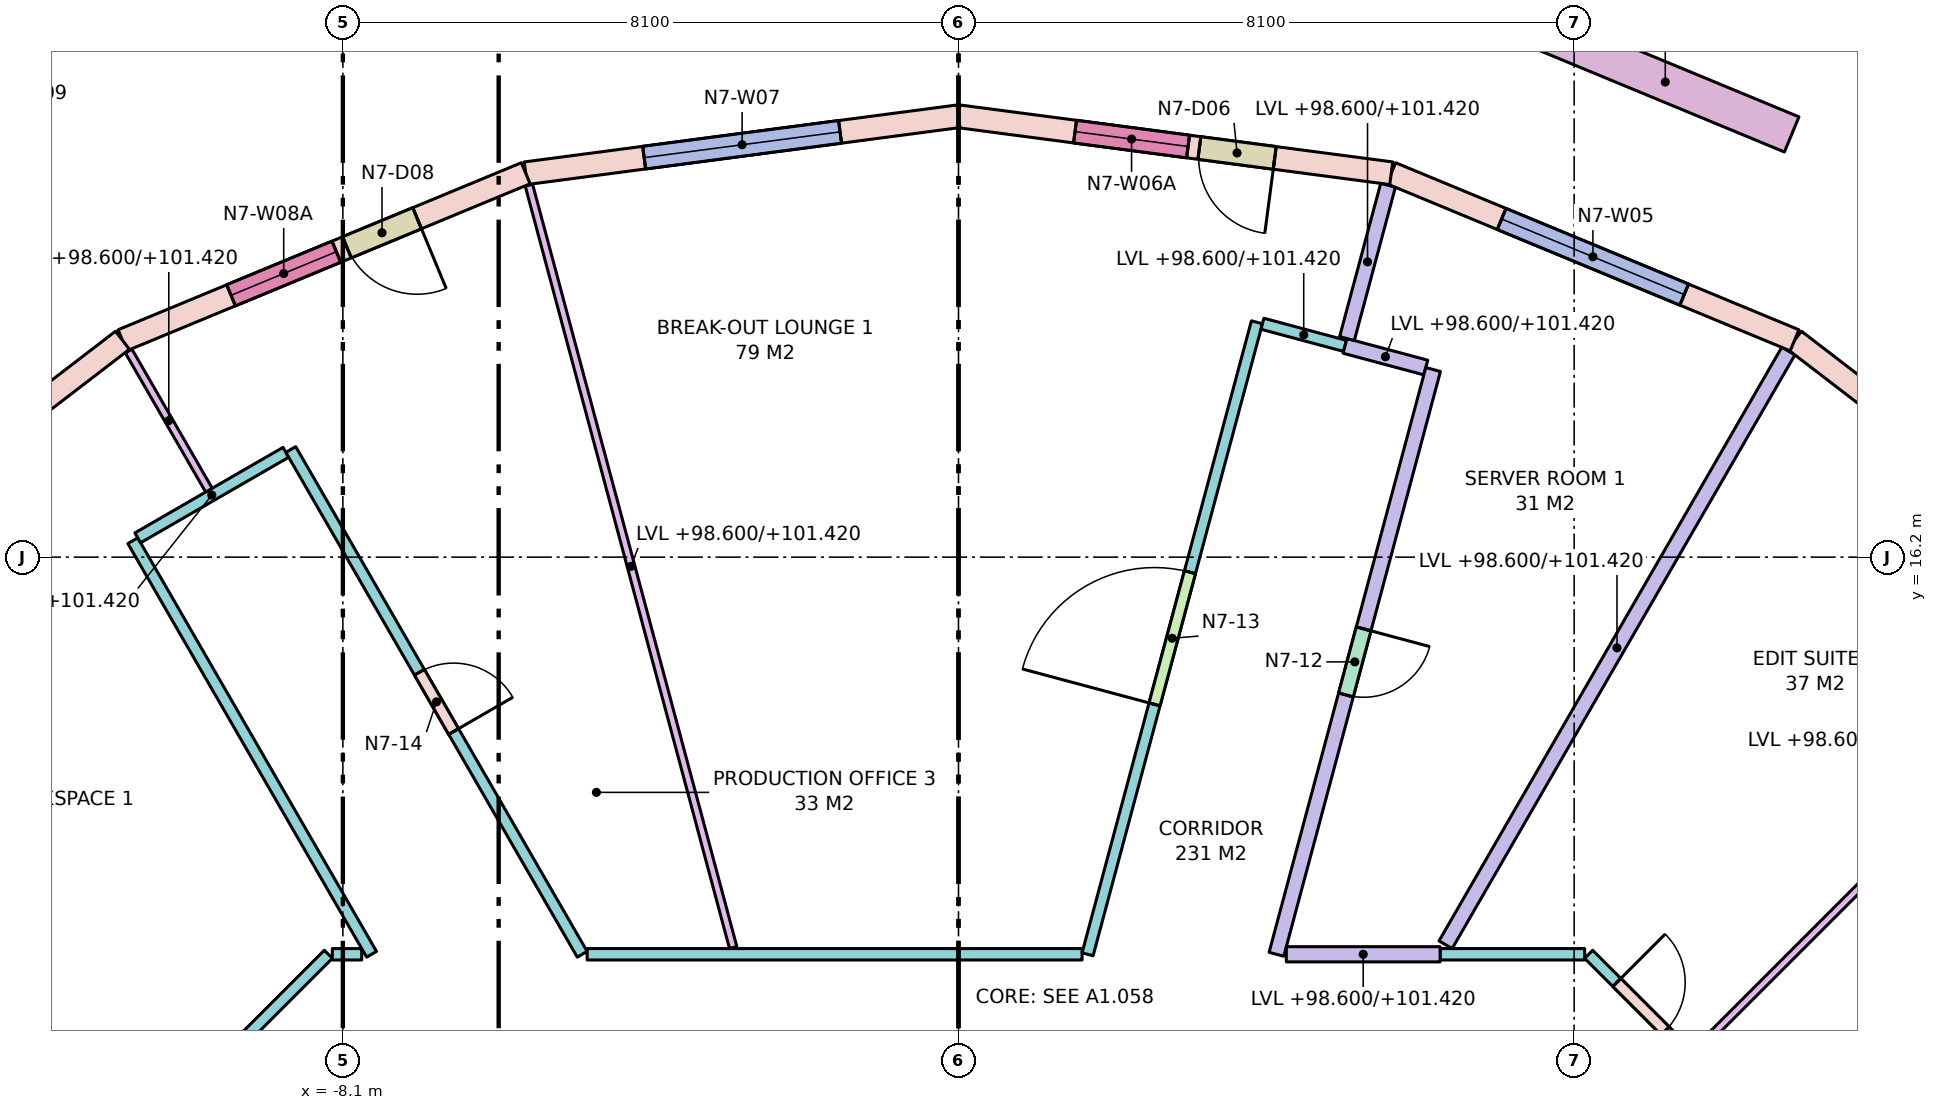
"""IFC4 building model, lengths in metres.
Left out: names, types, materials, properties, quantities, classifications, styles, units other than length and angle.
Written with IfcOpenShell. Run it as: python <this file> out.ifc"""

import sys

from ifc_helpers import new_model, si_unit, direction, frame, frame_2d, origin, place, context, subcontext, project, spatial, rectangle, extrude, element, fill, save


model = new_model("IFC4")
c1 = context("Model", 3, precision=1e-05, world=origin(), true_north=direction((0.0, 1.0)))
c2 = subcontext(c1, "Body", "Model", "MODEL_VIEW")
j1 = project(units=[si_unit("LENGTHUNIT", "METRE"), si_unit("PLANEANGLEUNIT", "RADIAN")], contexts=[c1])
p1 = place(None, origin())
s1 = spatial("IfcSite", under=j1, at=p1, CompositionType="ELEMENT")
p2 = place(p1, origin())
s2 = spatial("IfcBuilding", under=s1, at=p2, CompositionType="ELEMENT")
p3 = place(p2, frame((0.0, 0.0, 98.6)))
s3 = spatial("IfcBuildingStorey", under=s2, at=p3, CompositionType="ELEMENT", Elevation=98.6)
p4 = place(p3, frame((15.556, 15.556, 0.0), z_axis=(0.0, 0.0, 1.0), x_axis=(-0.793366142647, 0.608744744291, 0.0)))
e1 = element("IfcWall", 1, at=p4, inside=s3, PredefinedType="STANDARD", context=c2, shape_type="SweptSolid", body=[
    extrude(rectangle(XDim=5.743, YDim=0.3, at=frame_2d((2.872, 0.0))), origin(), (0.0, 0.0, 1.0), 3.72),
])
p5 = place(p4, frame((1.547, 0.0, 0.0)))
e2 = element("IfcOpeningElement", 2, at=p5, cuts=e1, PredefinedType="OPENING", context=c2, shape_type="SweptSolid", body=[
    extrude(rectangle(XDim=1.0, YDim=2.4, at=frame_2d((0.5, 1.2))), frame((0.0, 0.16, 0.0), z_axis=(0.0, -1.0, 0.0), x_axis=(1.0, 0.0, 0.0)), (0.0, 0.0, 1.0), 0.32),
])
p6 = place(p4, frame((2.697, 0.0, 0.8)))
e3 = element("IfcOpeningElement", 3, at=p6, cuts=e1, PredefinedType="OPENING", context=c2, shape_type="SweptSolid", body=[
    extrude(rectangle(XDim=1.5, YDim=2.7, at=frame_2d((0.75, 1.35))), frame((0.0, 0.16, 0.0), z_axis=(0.0, -1.0, 0.0), x_axis=(1.0, 0.0, 0.0)), (0.0, 0.0, 1.0), 0.32),
])
p7 = place(p3, frame((11.0, 19.052, 0.0), z_axis=(0.0, 0.0, 1.0), x_axis=(-0.923866055759, 0.382715966503, 0.0)))
e4 = element("IfcWall", 4, at=p7, inside=s3, PredefinedType="STANDARD", context=c2, shape_type="SweptSolid", body=[
    extrude(rectangle(XDim=5.743, YDim=0.3, at=frame_2d((2.872, 0.0))), origin(), (0.0, 0.0, 1.0), 3.72),
])
p8 = place(p7, frame((1.572, 0.0, 0.8)))
e5 = element("IfcOpeningElement", 5, at=p8, cuts=e4, PredefinedType="OPENING", context=c2, shape_type="SweptSolid", body=[
    extrude(rectangle(XDim=2.6, YDim=2.7, at=frame_2d((1.3, 1.35))), frame((0.0, 0.16, 0.0), z_axis=(0.0, -1.0, 0.0), x_axis=(1.0, 0.0, 0.0)), (0.0, 0.0, 1.0), 0.32),
])
p9 = place(p3, frame((5.694, 21.25, 0.0), z_axis=(0.0, 0.0, 1.0), x_axis=(-0.991447783331, 0.130503995834, 0.0)))
e6 = element("IfcWall", 6, at=p9, inside=s3, PredefinedType="STANDARD", context=c2, shape_type="SweptSolid", body=[
    extrude(rectangle(XDim=5.743, YDim=0.3, at=frame_2d((2.872, 0.0))), origin(), (0.0, 0.0, 1.0), 3.72),
])
p10 = place(p9, frame((1.547, 0.0, 0.0)))
e7 = element("IfcOpeningElement", 7, at=p10, cuts=e6, PredefinedType="OPENING", context=c2, shape_type="SweptSolid", body=[
    extrude(rectangle(XDim=1.0, YDim=2.4, at=frame_2d((0.5, 1.2))), frame((0.0, 0.16, 0.0), z_axis=(0.0, -1.0, 0.0), x_axis=(1.0, 0.0, 0.0)), (0.0, 0.0, 1.0), 0.32),
])
p11 = place(p9, frame((2.697, 0.0, 0.8)))
e8 = element("IfcOpeningElement", 8, at=p11, cuts=e6, PredefinedType="OPENING", context=c2, shape_type="SweptSolid", body=[
    extrude(rectangle(XDim=1.5, YDim=2.7, at=frame_2d((0.75, 1.35))), frame((0.0, 0.16, 0.0), z_axis=(0.0, -1.0, 0.0), x_axis=(1.0, 0.0, 0.0)), (0.0, 0.0, 1.0), 0.32),
])
p12 = place(p3, frame((0.0, 22.0, 0.0), z_axis=(0.0, 0.0, 1.0), x_axis=(-0.991447783331, -0.130503995834, 0.0)))
e9 = element("IfcWall", 9, at=p12, inside=s3, PredefinedType="STANDARD", context=c2, shape_type="SweptSolid", body=[
    extrude(rectangle(XDim=5.743, YDim=0.3, at=frame_2d((2.872, 0.0))), origin(), (0.0, 0.0, 1.0), 3.72),
])
p13 = place(p12, frame((1.572, 0.0, 0.8)))
e10 = element("IfcOpeningElement", 10, at=p13, cuts=e9, PredefinedType="OPENING", context=c2, shape_type="SweptSolid", body=[
    extrude(rectangle(XDim=2.6, YDim=2.7, at=frame_2d((1.3, 1.35))), frame((0.0, 0.16, 0.0), z_axis=(0.0, -1.0, 0.0), x_axis=(1.0, 0.0, 0.0)), (0.0, 0.0, 1.0), 0.32),
])
p14 = place(p3, frame((-5.694, 21.25, 0.0), z_axis=(0.0, 0.0, 1.0), x_axis=(-0.923866055759, -0.382715966503, 0.0)))
e11 = element("IfcWall", 11, at=p14, inside=s3, PredefinedType="STANDARD", context=c2, shape_type="SweptSolid", body=[
    extrude(rectangle(XDim=5.743, YDim=0.3, at=frame_2d((2.872, 0.0))), origin(), (0.0, 0.0, 1.0), 3.72),
])
p15 = place(p14, frame((1.547, 0.0, 0.0)))
e12 = element("IfcOpeningElement", 12, at=p15, cuts=e11, PredefinedType="OPENING", context=c2, shape_type="SweptSolid", body=[
    extrude(rectangle(XDim=1.0, YDim=2.4, at=frame_2d((0.5, 1.2))), frame((0.0, 0.16, 0.0), z_axis=(0.0, -1.0, 0.0), x_axis=(1.0, 0.0, 0.0)), (0.0, 0.0, 1.0), 0.32),
])
p16 = place(p14, frame((2.697, 0.0, 0.8)))
e13 = element("IfcOpeningElement", 13, at=p16, cuts=e11, PredefinedType="OPENING", context=c2, shape_type="SweptSolid", body=[
    extrude(rectangle(XDim=1.5, YDim=2.7, at=frame_2d((0.75, 1.35))), frame((0.0, 0.16, 0.0), z_axis=(0.0, -1.0, 0.0), x_axis=(1.0, 0.0, 0.0)), (0.0, 0.0, 1.0), 0.32),
])
p17 = place(p3, frame((-11.0, 19.052, 0.0), z_axis=(0.0, 0.0, 1.0), x_axis=(-0.793366142647, -0.608744744291, 0.0)))
e14 = element("IfcWall", 14, at=p17, inside=s3, PredefinedType="STANDARD", context=c2, shape_type="SweptSolid", body=[
    extrude(rectangle(XDim=5.743, YDim=0.3, at=frame_2d((2.872, 0.0))), origin(), (0.0, 0.0, 1.0), 3.72),
])
p18 = place(p17, frame((1.572, 0.0, 0.8)))
e15 = element("IfcOpeningElement", 15, at=p18, cuts=e14, PredefinedType="OPENING", context=c2, shape_type="SweptSolid", body=[
    extrude(rectangle(XDim=2.6, YDim=2.7, at=frame_2d((1.3, 1.35))), frame((0.0, 0.16, 0.0), z_axis=(0.0, -1.0, 0.0), x_axis=(1.0, 0.0, 0.0)), (0.0, 0.0, 1.0), 0.32),
])
p19 = place(p3, frame((10.962, 21.761, 0.0), z_axis=(0.0, 0.0, 1.0), x_axis=(-0.923875488976, 0.382693194178, 0.0)))
e16 = element("IfcWall", 16, at=p19, inside=s3, PredefinedType="PARAPET", context=c2, shape_type="SweptSolid", body=[
    extrude(rectangle(XDim=3.6, YDim=0.5, at=frame_2d((1.8, 0.0))), origin(), (0.0, 0.0, 1.0), 0.9),
])
p20 = place(p3, frame((-12.975, 6.291, 0.0), z_axis=(0.0, 0.0, 1.0), x_axis=(0.707106781187, 0.707106781187, 0.0)))
e17 = element("IfcWall", 17, at=p20, inside=s3, PredefinedType="PARTITIONING", context=c2, shape_type="SweptSolid", body=[
    extrude(rectangle(XDim=6.624, YDim=0.15, at=frame_2d((3.312, 0.0))), origin(), (0.0, 0.0, 1.0), 2.82),
])
p21 = place(p20, frame((2.412, 0.0, 0.0)))
e18 = element("IfcOpeningElement", 18, at=p21, cuts=e17, PredefinedType="OPENING", context=c2, shape_type="SweptSolid", body=[
    extrude(rectangle(XDim=1.8, YDim=2.1, at=frame_2d((0.9, 1.05))), frame((0.0, 0.085, 0.0), z_axis=(0.0, -1.0, 0.0), x_axis=(1.0, 0.0, 0.0)), (0.0, 0.0, 1.0), 0.17),
])
p22 = place(p3, frame((-8.238, 10.975, 0.0), z_axis=(0.0, 0.0, 1.0), x_axis=(1.0, 0.0, 0.0)))
e19 = element("IfcWall", 19, at=p22, inside=s3, PredefinedType="PARTITIONING", context=c2, shape_type="SweptSolid", body=[
    extrude(rectangle(XDim=0.386, YDim=0.15, at=frame_2d((0.193, 0.0))), origin(), (0.0, 0.0, 1.0), 3.72),
])
p23 = place(p3, frame((-7.722, 10.975, 0.0), z_axis=(0.0, 0.0, 1.0), x_axis=(-0.499988183684, 0.86603222583, 0.0)))
e20 = element("IfcWall", 20, at=p23, inside=s3, PredefinedType="PARTITIONING", context=c2, shape_type="SweptSolid", body=[
    extrude(rectangle(XDim=6.283, YDim=0.15, at=frame_2d((3.142, 0.0))), origin(), (0.0, 0.0, 1.0), 3.72),
])
p24 = place(p3, frame((-10.799, 16.454, 0.0), z_axis=(0.0, 0.0, 1.0), x_axis=(0.866017533419, 0.500013631625, 0.0)))
e21 = element("IfcWall", 21, at=p24, inside=s3, PredefinedType="PARTITIONING", context=c2, shape_type="SweptSolid", body=[
    extrude(rectangle(XDim=2.25, YDim=0.15, at=frame_2d((1.125, 0.0))), origin(), (0.0, 0.0, 1.0), 2.82),
])
p25 = place(p3, frame((-8.785, 17.616, 0.0), z_axis=(0.0, 0.0, 1.0), x_axis=(0.500021918639, -0.866012748683, 0.0)))
e22 = element("IfcWall", 22, at=p25, inside=s3, PredefinedType="PARTITIONING", context=c2, shape_type="SweptSolid", body=[
    extrude(rectangle(XDim=7.669, YDim=0.15, at=frame_2d((3.834, 0.0))), origin(), (0.0, 0.0, 1.0), 3.72),
])
p26 = place(p25, frame((3.384, 0.0, 0.0)))
e23 = element("IfcOpeningElement", 23, at=p26, cuts=e22, PredefinedType="OPENING", context=c2, shape_type="SweptSolid", body=[
    extrude(rectangle(XDim=0.9, YDim=2.1, at=frame_2d((0.45, 1.05))), frame((0.0, 0.085, 0.0), z_axis=(0.0, -1.0, 0.0), x_axis=(1.0, 0.0, 0.0)), (0.0, 0.0, 1.0), 0.17),
])
p27 = place(p3, frame((-4.886, 10.975, 0.0), z_axis=(0.0, 0.0, 1.0), x_axis=(1.0, 0.0, 0.0)))
e24 = element("IfcWall", 24, at=p27, inside=s3, PredefinedType="PARTITIONING", context=c2, shape_type="SweptSolid", body=[
    extrude(rectangle(XDim=6.512, YDim=0.15, at=frame_2d((3.256, 0.0))), origin(), (0.0, 0.0, 1.0), 2.82),
])
p28 = place(p3, frame((1.698, 10.975, 0.0), z_axis=(0.0, 0.0, 1.0), x_axis=(0.258804606039, 0.965929695109, 0.0)))
e25 = element("IfcWall", 25, at=p28, inside=s3, PredefinedType="PARTITIONING", context=c2, shape_type="SweptSolid", body=[
    extrude(rectangle(XDim=8.608, YDim=0.15, at=frame_2d((4.304, 0.0))), origin(), (0.0, 0.0, 1.0), 3.72),
])
p29 = place(p28, frame((3.404, 0.0, 0.0)))
e26 = element("IfcOpeningElement", 26, at=p29, cuts=e25, PredefinedType="OPENING", context=c2, shape_type="SweptSolid", body=[
    extrude(rectangle(XDim=1.8, YDim=2.1, at=frame_2d((0.9, 1.05))), frame((0.0, 0.085, 0.0), z_axis=(0.0, -1.0, 0.0), x_axis=(1.0, 0.0, 0.0)), (0.0, 0.0, 1.0), 0.17),
])
p30 = place(p3, frame((3.999, 19.271, 0.0), z_axis=(0.0, 0.0, 1.0), x_axis=(0.965906393436, -0.258891558609, 0.0)))
e27 = element("IfcWall", 27, at=p30, inside=s3, PredefinedType="PARTITIONING", context=c2, shape_type="SweptSolid", body=[
    extrude(rectangle(XDim=1.125, YDim=0.15, at=frame_2d((0.562, 0.0))), origin(), (0.0, 0.0, 1.0), 2.82),
])
p31 = place(p3, frame((5.085, 18.979, 0.0), z_axis=(0.0, 0.0, 1.0), x_axis=(0.965932200741, -0.258795254151, 0.0)))
e28 = element("IfcWall", 28, at=p31, inside=s3, PredefinedType="PARTITIONING", context=c2, shape_type="SweptSolid", body=[
    extrude(rectangle(XDim=1.1, YDim=0.2, at=frame_2d((0.55, 0.0))), origin(), (0.0, 0.0, 1.0), 2.82),
])
p32 = place(p3, frame((6.245, 18.669, 0.0), z_axis=(0.0, 0.0, 1.0), x_axis=(-0.258822393938, -0.965924928965, 0.0)))
e29 = element("IfcWall", 29, at=p32, inside=s3, PredefinedType="PARTITIONING", context=c2, shape_type="SweptSolid", body=[
    extrude(rectangle(XDim=7.965, YDim=0.2, at=frame_2d((3.982, 0.0))), origin(), (0.0, 0.0, 1.0), 3.72),
])
p33 = place(p32, frame((3.532, 0.0, 0.0)))
e30 = element("IfcOpeningElement", 30, at=p33, cuts=e29, PredefinedType="OPENING", context=c2, shape_type="SweptSolid", body=[
    extrude(rectangle(XDim=0.9, YDim=2.1, at=frame_2d((0.45, 1.05))), frame((0.0, 0.11, 0.0), z_axis=(0.0, -1.0, 0.0), x_axis=(1.0, 0.0, 0.0)), (0.0, 0.0, 1.0), 0.22),
])
p34 = place(p3, frame((4.313, 10.975, 0.0), z_axis=(0.0, 0.0, 1.0), x_axis=(1.0, 0.0, 0.0)))
e31 = element("IfcWall", 31, at=p34, inside=s3, PredefinedType="PARTITIONING", context=c2, shape_type="SweptSolid", body=[
    extrude(rectangle(XDim=2.023, YDim=0.2, at=frame_2d((1.012, 0.0))), origin(), (0.0, 0.0, 1.0), 2.82),
])
p35 = place(p3, frame((6.336, 10.975, 0.0), z_axis=(0.0, 0.0, 1.0), x_axis=(1.0, 0.0, 0.0)))
e32 = element("IfcWall", 32, at=p35, inside=s3, PredefinedType="PARTITIONING", context=c2, shape_type="SweptSolid", body=[
    extrude(rectangle(XDim=1.902, YDim=0.15, at=frame_2d((0.951, 0.0))), origin(), (0.0, 0.0, 1.0), 2.82),
])
p36 = place(p3, frame((8.291, 10.975, 0.0), z_axis=(0.0, 0.0, 1.0), x_axis=(0.707106781187, -0.707106781187, 0.0)))
e33 = element("IfcWall", 33, at=p36, inside=s3, PredefinedType="PARTITIONING", context=c2, shape_type="SweptSolid", body=[
    extrude(rectangle(XDim=6.624, YDim=0.15, at=frame_2d((3.312, 0.0))), origin(), (0.0, 0.0, 1.0), 2.82),
])
p37 = place(p36, frame((3.274, 0.0, 0.0)))
e34 = element("IfcOpeningElement", 34, at=p37, cuts=e33, PredefinedType="OPENING", context=c2, shape_type="SweptSolid", body=[
    extrude(rectangle(XDim=0.9, YDim=2.1, at=frame_2d((0.45, 1.05))), frame((0.0, 0.085, 0.0), z_axis=(0.0, -1.0, 0.0), x_axis=(1.0, 0.0, 0.0)), (0.0, 0.0, 1.0), 0.17),
])
p38 = place(p36, frame((0.524, 0.0, 0.0)))
e35 = element("IfcOpeningElement", 35, at=p38, cuts=e33, PredefinedType="OPENING", context=c2, shape_type="SweptSolid", body=[
    extrude(rectangle(XDim=0.9, YDim=2.1, at=frame_2d((0.45, 1.05))), frame((0.0, 0.085, 0.0), z_axis=(0.0, -1.0, 0.0), x_axis=(1.0, 0.0, 0.0)), (0.0, 0.0, 1.0), 0.17),
])
p39 = place(p3, frame((9.686, 9.686, 0.0), z_axis=(0.0, 0.0, 1.0), x_axis=(0.707106781187, 0.707106781187, 0.0)))
e36 = element("IfcWall", 36, at=p39, inside=s3, PredefinedType="PARTITIONING", context=c2, shape_type="SweptSolid", body=[
    extrude(rectangle(XDim=8.139, YDim=0.1, at=frame_2d((4.069, 0.0))), origin(), (0.0, 0.0, 1.0), 2.82),
])
p40 = place(p3, frame((6.409, 11.101, 0.0), z_axis=(0.0, 0.0, 1.0), x_axis=(0.500008327793, 0.866020595677, 0.0)))
e37 = element("IfcWall", 37, at=p40, inside=s3, PredefinedType="PARTITIONING", context=c2, shape_type="SweptSolid", body=[
    extrude(rectangle(XDim=9.019, YDim=0.2, at=frame_2d((4.509, 0.0))), origin(), (0.0, 0.0, 1.0), 2.82),
])
p41 = place(p3, frame((5.111, 19.076, 0.0), z_axis=(0.0, 0.0, 1.0), x_axis=(0.258870505712, 0.965912035991, 0.0)))
e38 = element("IfcWall", 38, at=p41, inside=s3, PredefinedType="PARTITIONING", context=c2, shape_type="SweptSolid", body=[
    extrude(rectangle(XDim=2.088, YDim=0.2, at=frame_2d((1.044, 0.0))), origin(), (0.0, 0.0, 1.0), 2.82),
])
p42 = place(p3, frame((-2.965, 11.064, 0.0), z_axis=(0.0, 0.0, 1.0), x_axis=(-0.258834819477, 0.96592159942, 0.0)))
e39 = element("IfcWall", 39, at=p42, inside=s3, PredefinedType="PARTITIONING", context=c2, shape_type="SweptSolid", body=[
    extrude(rectangle(XDim=10.382, YDim=0.1, at=frame_2d((5.191, 0.0))), origin(), (0.0, 0.0, 1.0), 2.82),
])
p43 = place(p3, frame((-9.862, 17.081, 0.0), z_axis=(0.0, 0.0, 1.0), x_axis=(-0.500065834316, 0.865987390988, 0.0)))
e40 = element("IfcWall", 40, at=p43, inside=s3, PredefinedType="PARTITIONING", context=c2, shape_type="SweptSolid", body=[
    extrude(rectangle(XDim=2.113, YDim=0.1, at=frame_2d((1.057, 0.0))), origin(), (0.0, 0.0, 1.0), 2.82),
])
p44 = place(p8, origin())
e41 = element("IfcWindow", 41, at=p44, inside=s3, PartitioningType="SINGLE_PANEL", PredefinedType="WINDOW", context=c2, shape_type="SweptSolid", body=[
    extrude(rectangle(XDim=2.6, YDim=2.7, at=frame_2d((1.3, 1.35))), frame((0.0, 0.03, 0.0), z_axis=(0.0, -1.0, 0.0), x_axis=(1.0, 0.0, 0.0)), (0.0, 0.0, 1.0), 0.06),
])
fill(e5, e41)
p45 = place(p10, origin())
e42 = element("IfcDoor", 42, at=p45, inside=s3, OperationType="SINGLE_SWING_LEFT", PredefinedType="DOOR", context=c2, shape_type="SweptSolid", body=[
    extrude(rectangle(XDim=1.0, YDim=2.4, at=frame_2d((0.5, 1.2))), frame((0.0, 0.025, 0.0), z_axis=(0.0, -1.0, 0.0), x_axis=(1.0, 0.0, 0.0)), (0.0, 0.0, 1.0), 0.05),
])
fill(e7, e42)
p46 = place(p11, origin())
e43 = element("IfcWindow", 43, at=p46, inside=s3, PartitioningType="SINGLE_PANEL", PredefinedType="WINDOW", context=c2, shape_type="SweptSolid", body=[
    extrude(rectangle(XDim=1.5, YDim=2.7, at=frame_2d((0.75, 1.35))), frame((0.0, 0.03, 0.0), z_axis=(0.0, -1.0, 0.0), x_axis=(1.0, 0.0, 0.0)), (0.0, 0.0, 1.0), 0.06),
])
fill(e8, e43)
p47 = place(p13, origin())
e44 = element("IfcWindow", 44, at=p47, inside=s3, PartitioningType="SINGLE_PANEL", PredefinedType="WINDOW", context=c2, shape_type="SweptSolid", body=[
    extrude(rectangle(XDim=2.6, YDim=2.7, at=frame_2d((1.3, 1.35))), frame((0.0, 0.03, 0.0), z_axis=(0.0, -1.0, 0.0), x_axis=(1.0, 0.0, 0.0)), (0.0, 0.0, 1.0), 0.06),
])
fill(e10, e44)
p48 = place(p15, origin())
e45 = element("IfcDoor", 45, at=p48, inside=s3, OperationType="SINGLE_SWING_LEFT", PredefinedType="DOOR", context=c2, shape_type="SweptSolid", body=[
    extrude(rectangle(XDim=1.0, YDim=2.4, at=frame_2d((0.5, 1.2))), frame((0.0, 0.025, 0.0), z_axis=(0.0, -1.0, 0.0), x_axis=(1.0, 0.0, 0.0)), (0.0, 0.0, 1.0), 0.05),
])
fill(e12, e45)
p49 = place(p16, origin())
e46 = element("IfcWindow", 46, at=p49, inside=s3, PartitioningType="SINGLE_PANEL", PredefinedType="WINDOW", context=c2, shape_type="SweptSolid", body=[
    extrude(rectangle(XDim=1.5, YDim=2.7, at=frame_2d((0.75, 1.35))), frame((0.0, 0.03, 0.0), z_axis=(0.0, -1.0, 0.0), x_axis=(1.0, 0.0, 0.0)), (0.0, 0.0, 1.0), 0.06),
])
fill(e13, e46)
p50 = place(p38, origin())
e47 = element("IfcDoor", 47, at=p50, inside=s3, OperationType="SINGLE_SWING_LEFT", PredefinedType="DOOR", context=c2, shape_type="SweptSolid", body=[
    extrude(rectangle(XDim=0.9, YDim=2.1, at=frame_2d((0.45, 1.05))), frame((0.0, 0.025, 0.0), z_axis=(0.0, -1.0, 0.0), x_axis=(1.0, 0.0, 0.0)), (0.0, 0.0, 1.0), 0.05),
])
fill(e35, e47)
p51 = place(p33, origin())
e48 = element("IfcDoor", 48, at=p51, inside=s3, OperationType="SINGLE_SWING_LEFT", PredefinedType="DOOR", context=c2, shape_type="SweptSolid", body=[
    extrude(rectangle(XDim=0.9, YDim=2.1, at=frame_2d((0.45, 1.05))), frame((0.0, 0.025, 0.0), z_axis=(0.0, -1.0, 0.0), x_axis=(1.0, 0.0, 0.0)), (0.0, 0.0, 1.0), 0.05),
])
fill(e30, e48)
p52 = place(p29, origin())
e49 = element("IfcDoor", 49, at=p52, inside=s3, OperationType="DOUBLE_DOOR_SINGLE_SWING", PredefinedType="DOOR", context=c2, shape_type="SweptSolid", body=[
    extrude(rectangle(XDim=1.8, YDim=2.1, at=frame_2d((0.9, 1.05))), frame((0.0, 0.025, 0.0), z_axis=(0.0, -1.0, 0.0), x_axis=(1.0, 0.0, 0.0)), (0.0, 0.0, 1.0), 0.05),
])
fill(e26, e49)
p53 = place(p26, origin())
e50 = element("IfcDoor", 50, at=p53, inside=s3, OperationType="SINGLE_SWING_RIGHT", PredefinedType="DOOR", context=c2, shape_type="SweptSolid", body=[
    extrude(rectangle(XDim=0.9, YDim=2.1, at=frame_2d((0.45, 1.05))), frame((0.0, 0.025, 0.0), z_axis=(0.0, -1.0, 0.0), x_axis=(1.0, 0.0, 0.0)), (0.0, 0.0, 1.0), 0.05),
])
fill(e23, e50)
save(model, sys.argv[1])
